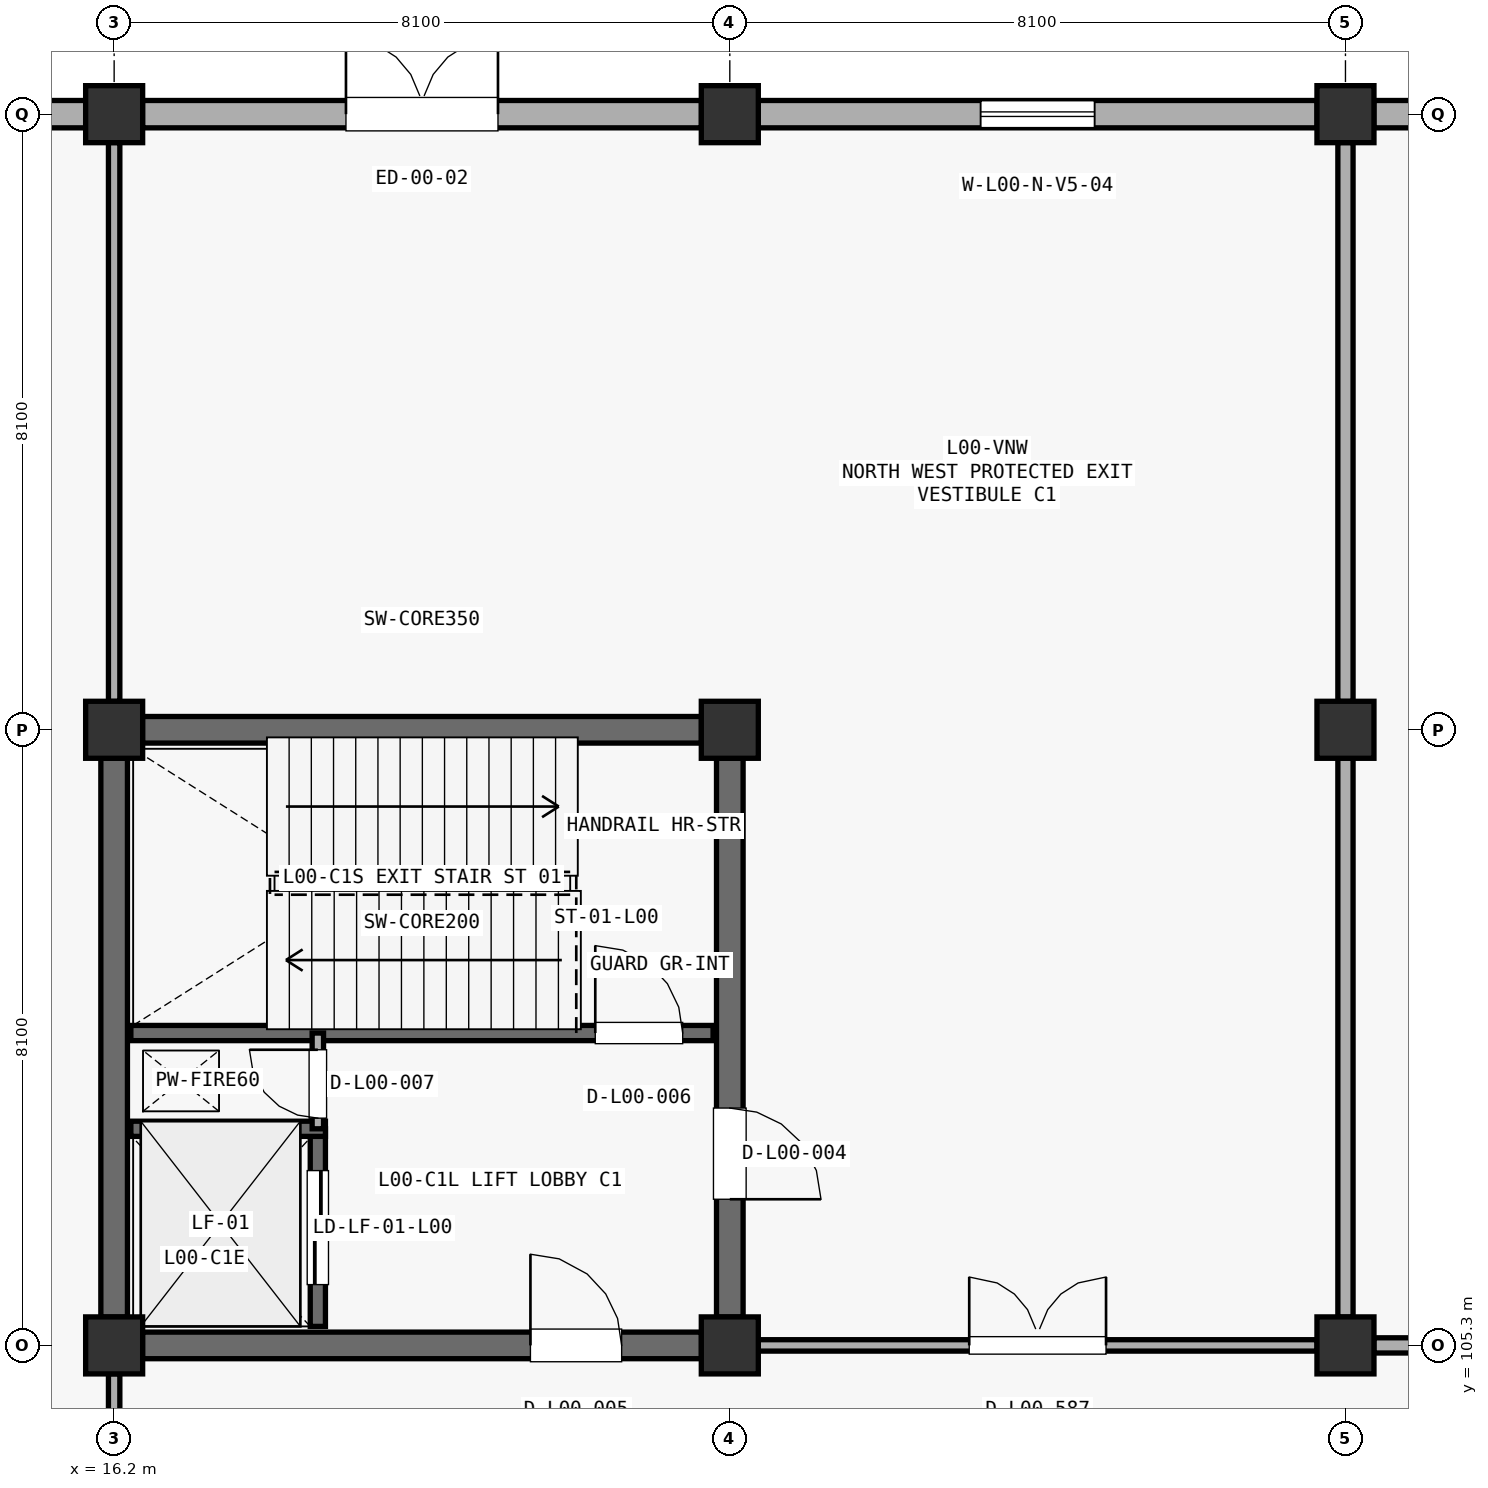
"""IFC4 building model, lengths in metres.
Left out: names, types, materials, properties, quantities, classifications, styles, units other than length and angle.
Written with IfcOpenShell. Run it as: python <this file> out.ifc"""

import sys

from ifc_helpers import new_model, si_unit, direction, frame, frame_2d, origin, origin_2d, place, context, subcontext, project, spatial, rectangle, extrude, element, fill, save


model = new_model("IFC4")
c1 = context("Model", 3, precision=1e-05, world=origin(), true_north=direction((0.0, 1.0)))
c2 = subcontext(c1, "Body", "Model", "MODEL_VIEW")
j1 = project(units=[si_unit("LENGTHUNIT", "METRE"), si_unit("PLANEANGLEUNIT", "RADIAN")], contexts=[c1])
p1 = place(None, origin())
s1 = spatial("IfcSite", under=j1, at=p1, CompositionType="ELEMENT")
p2 = place(p1, origin())
s2 = spatial("IfcBuilding", under=s1, at=p2, CompositionType="ELEMENT")
p3 = place(p2, origin())
s3 = spatial("IfcBuildingStorey", under=s2, at=p3, CompositionType="ELEMENT", Elevation=0.0)
for number, where, z_axis, x_axis in (
    (1, (16.2, 105.3, 0.0), (0.0, 0.0, 1.0), (1.0, 0.0, 0.0)),
    (2, (16.2, 113.4, 0.0), (0.0, 0.0, 1.0), (1.0, 0.0, 0.0)),
    (3, (16.2, 121.5, 0.0), (0.0, 0.0, 1.0), (1.0, 0.0, 0.0)),
    (4, (24.3, 105.3, 0.0), (0.0, 0.0, 1.0), (1.0, 0.0, 0.0)),
    (5, (24.3, 113.4, 0.0), (0.0, 0.0, 1.0), (1.0, 0.0, 0.0)),
    (6, (24.3, 121.5, 0.0), (0.0, 0.0, 1.0), (1.0, 0.0, 0.0)),
    (7, (32.4, 105.3, 0.0), (0.0, 0.0, 1.0), (1.0, 0.0, 0.0)),
    (8, (32.4, 113.4, 0.0), (0.0, 0.0, 1.0), (1.0, 0.0, 0.0)),
    (9, (32.4, 121.5, 0.0), (0.0, 0.0, 1.0), (1.0, 0.0, 0.0)),
):
    element("IfcColumn", number, at=place(p3, frame(where, z_axis=z_axis, x_axis=x_axis)), inside=s3, PredefinedType="COLUMN", context=c2, shape_type="SweptSolid", body=[
        extrude(rectangle(XDim=0.75, YDim=0.75, at=origin_2d()), origin(), (0.0, 0.0, 1.0), 5.1),
    ])
p4 = place(p3, frame((8.473, 121.5, 0.0), z_axis=(0.0, 0.0, 1.0), x_axis=(1.0, 0.0, 0.0)))
e10 = element("IfcWall", 10, at=p4, inside=s3, PredefinedType="STANDARD", context=c2, shape_type="SweptSolid", body=[
    extrude(rectangle(XDim=7.354, YDim=0.36, at=frame_2d((3.677, 0.0))), origin(), (0.0, 0.0, 1.0), 4.222),
])
p5 = place(p4, frame((2.477, 0.0, 0.0)))
e11 = element("IfcOpeningElement", 11, at=p5, cuts=e10, PredefinedType="OPENING", context=c2, shape_type="SweptSolid", body=[
    extrude(rectangle(XDim=2.4, YDim=2.4, at=frame_2d((1.2, 1.2))), frame((0.0, 0.19, 0.0), z_axis=(0.0, -1.0, 0.0), x_axis=(1.0, 0.0, 0.0)), (0.0, 0.0, 1.0), 0.38),
])
p6 = place(p3, frame((16.573, 121.5, 0.0), z_axis=(0.0, 0.0, 1.0), x_axis=(1.0, 0.0, 0.0)))
e12 = element("IfcWall", 12, at=p6, inside=s3, PredefinedType="STANDARD", context=c2, shape_type="SweptSolid", body=[
    extrude(rectangle(XDim=7.354, YDim=0.36, at=frame_2d((3.677, 0.0))), origin(), (0.0, 0.0, 1.0), 3.972),
])
p7 = place(p6, frame((2.677, 0.0, 0.0)))
e13 = element("IfcOpeningElement", 13, at=p7, cuts=e12, PredefinedType="OPENING", context=c2, shape_type="SweptSolid", body=[
    extrude(rectangle(XDim=2.0, YDim=2.2, at=frame_2d((1.0, 1.1))), frame((0.0, 0.19, 0.0), z_axis=(0.0, -1.0, 0.0), x_axis=(1.0, 0.0, 0.0)), (0.0, 0.0, 1.0), 0.38),
])
p8 = place(p3, frame((24.673, 121.5, 0.0), z_axis=(0.0, 0.0, 1.0), x_axis=(1.0, 0.0, 0.0)))
e14 = element("IfcWall", 14, at=p8, inside=s3, PredefinedType="STANDARD", context=c2, shape_type="SweptSolid", body=[
    extrude(rectangle(XDim=7.354, YDim=0.36, at=frame_2d((3.677, 0.0))), origin(), (0.0, 0.0, 1.0), 4.407),
])
p9 = place(p8, frame((2.927, 0.0, 0.85)))
e15 = element("IfcOpeningElement", 15, at=p9, cuts=e14, PredefinedType="OPENING", context=c2, shape_type="SweptSolid", body=[
    extrude(rectangle(XDim=1.5, YDim=1.6, at=frame_2d((0.75, 0.8))), frame((0.0, 0.19, 0.0), z_axis=(0.0, -1.0, 0.0), x_axis=(1.0, 0.0, 0.0)), (0.0, 0.0, 1.0), 0.38),
])
p10 = place(p3, frame((32.773, 121.5, 0.0), z_axis=(0.0, 0.0, 1.0), x_axis=(1.0, 0.0, 0.0)))
e16 = element("IfcWall", 16, at=p10, inside=s3, PredefinedType="STANDARD", context=c2, shape_type="SweptSolid", body=[
    extrude(rectangle(XDim=7.354, YDim=0.36, at=frame_2d((3.677, 0.0))), origin(), (0.0, 0.0, 1.0), 4.072),
])
p11 = place(p10, frame((2.477, 0.0, 0.0)))
e17 = element("IfcOpeningElement", 17, at=p11, cuts=e16, PredefinedType="OPENING", context=c2, shape_type="SweptSolid", body=[
    extrude(rectangle(XDim=2.4, YDim=2.4, at=frame_2d((1.2, 1.2))), frame((0.0, 0.19, 0.0), z_axis=(0.0, -1.0, 0.0), x_axis=(1.0, 0.0, 0.0)), (0.0, 0.0, 1.0), 0.38),
])
for number, where, z_axis, x_axis in (
    (18, (16.573, 113.4, 0.0), (0.0, 0.0, 1.0), (1.0, 0.0, 0.0)),
    (19, (16.2, 105.673, 0.0), (0.0, 0.0, 1.0), (0.0, 1.0, 0.0)),
):
    element("IfcWall", number, at=place(p3, frame(where, z_axis=z_axis, x_axis=x_axis)), inside=s3, PredefinedType="SHEAR", context=c2, shape_type="SweptSolid", body=[
        extrude(rectangle(XDim=7.354, YDim=0.35, at=frame_2d((3.677, 0.0))), origin(), (0.0, 0.0, 1.0), 4.822),
    ])
p12 = place(p3, frame((24.3, 105.673, 0.0), z_axis=(0.0, 0.0, 1.0), x_axis=(0.0, 1.0, 0.0)))
e20 = element("IfcWall", 20, at=p12, inside=s3, PredefinedType="SHEAR", context=c2, shape_type="SweptSolid", body=[
    extrude(rectangle(XDim=7.354, YDim=0.35, at=frame_2d((3.677, 0.0))), origin(), (0.0, 0.0, 1.0), 4.822),
])
p13 = place(p12, frame((2.75, 0.0, 0.0), z_axis=(0.0, 0.0, 1.0), x_axis=(-1.0, 0.0, 0.0)))
e21 = element("IfcOpeningElement", 21, at=p13, cuts=e20, PredefinedType="OPENING", context=c2, shape_type="SweptSolid", body=[
    extrude(rectangle(XDim=1.2, YDim=2.2, at=frame_2d((0.6, 1.1))), frame((0.0, 0.185, 0.0), z_axis=(0.0, -1.0, 0.0), x_axis=(1.0, 0.0, 0.0)), (0.0, 0.0, 1.0), 0.37),
])
p14 = place(p3, frame((16.573, 105.3, 0.0), z_axis=(0.0, 0.0, 1.0), x_axis=(1.0, 0.0, 0.0)))
e22 = element("IfcWall", 22, at=p14, inside=s3, PredefinedType="SHEAR", context=c2, shape_type="SweptSolid", body=[
    extrude(rectangle(XDim=7.354, YDim=0.35, at=frame_2d((3.677, 0.0))), origin(), (0.0, 0.0, 1.0), 4.822),
])
p15 = place(p14, frame((5.104, 0.0, 0.0)))
e23 = element("IfcOpeningElement", 23, at=p15, cuts=e22, PredefinedType="OPENING", context=c2, shape_type="SweptSolid", body=[
    extrude(rectangle(XDim=1.2, YDim=2.2, at=frame_2d((0.6, 1.1))), frame((0.0, 0.185, 0.0), z_axis=(0.0, -1.0, 0.0), x_axis=(1.0, 0.0, 0.0)), (0.0, 0.0, 1.0), 0.37),
])
p16 = place(p3, frame((16.42, 109.41, 0.0), z_axis=(0.0, 0.0, 1.0), x_axis=(1.0, 0.0, 0.0)))
e24 = element("IfcWall", 24, at=p16, inside=s3, PredefinedType="SHEAR", context=c2, shape_type="SweptSolid", body=[
    extrude(rectangle(XDim=7.66, YDim=0.2, at=frame_2d((3.83, 0.0))), origin(), (0.0, 0.0, 1.0), 4.822),
])
p17 = place(p16, frame((6.11, 0.0, 0.0)))
e25 = element("IfcOpeningElement", 25, at=p17, cuts=e24, PredefinedType="OPENING", context=c2, shape_type="SweptSolid", body=[
    extrude(rectangle(XDim=1.15, YDim=2.2, at=frame_2d((0.575, 1.1))), frame((0.0, 0.11, 0.0), z_axis=(0.0, -1.0, 0.0), x_axis=(1.0, 0.0, 0.0)), (0.0, 0.0, 1.0), 0.22),
])
p18 = place(p3, frame((18.88, 105.55, 0.0), z_axis=(0.0, 0.0, 1.0), x_axis=(0.0, 1.0, 0.0)))
e26 = element("IfcWall", 26, at=p18, inside=s3, PredefinedType="SHEAR", context=c2, shape_type="SweptSolid", body=[
    extrude(rectangle(XDim=2.6, YDim=0.2, at=frame_2d((1.3, 0.0))), origin(), (0.0, 0.0, 1.0), 4.822),
])
p19 = place(p18, frame((0.55, 0.0, 0.0)))
e27 = element("IfcOpeningElement", 27, at=p19, cuts=e26, PredefinedType="OPENING", context=c2, shape_type="SweptSolid", body=[
    extrude(rectangle(XDim=1.5, YDim=2.3, at=frame_2d((0.75, 1.15))), frame((0.0, 0.11, 0.0), z_axis=(0.0, -1.0, 0.0), x_axis=(1.0, 0.0, 0.0)), (0.0, 0.0, 1.0), 0.22),
])
p20 = place(p3, frame((16.42, 108.15, 0.0), z_axis=(0.0, 0.0, 1.0), x_axis=(1.0, 0.0, 0.0)))
e28 = element("IfcWall", 28, at=p20, inside=s3, PredefinedType="SHEAR", context=c2, shape_type="SweptSolid", body=[
    extrude(rectangle(XDim=2.56, YDim=0.2, at=frame_2d((1.28, 0.0))), origin(), (0.0, 0.0, 1.0), 4.822),
])
p21 = place(p3, frame((18.88, 108.15, 0.0), z_axis=(0.0, 0.0, 1.0), x_axis=(0.0, 1.0, 0.0)))
e29 = element("IfcWall", 29, at=p21, inside=s3, PredefinedType="PARTITIONING", context=c2, shape_type="SweptSolid", body=[
    extrude(rectangle(XDim=1.26, YDim=0.15, at=frame_2d((0.63, 0.0))), origin(), (0.0, 0.0, 1.0), 4.822),
])
p22 = place(p21, frame((0.14, 0.0, 0.0)))
e30 = element("IfcOpeningElement", 30, at=p22, cuts=e29, PredefinedType="OPENING", context=c2, shape_type="SweptSolid", body=[
    extrude(rectangle(XDim=0.9, YDim=2.15, at=frame_2d((0.45, 1.075))), frame((0.0, 0.085, 0.0), z_axis=(0.0, -1.0, 0.0), x_axis=(1.0, 0.0, 0.0)), (0.0, 0.0, 1.0), 0.17),
])
p23 = place(p3, frame((16.2, 97.573, 0.0), z_axis=(0.0, 0.0, 1.0), x_axis=(0.0, 1.0, 0.0)))
e31 = element("IfcWall", 31, at=p23, inside=s3, PredefinedType="PARTITIONING", context=c2, shape_type="SweptSolid", body=[
    extrude(rectangle(XDim=7.354, YDim=0.15, at=frame_2d((3.677, 0.0))), origin(), (0.0, 0.0, 1.0), 4.222),
])
p24 = place(p23, frame((2.857, 0.0, 0.0)))
e32 = element("IfcOpeningElement", 32, at=p24, cuts=e31, PredefinedType="OPENING", context=c2, shape_type="SweptSolid", body=[
    extrude(rectangle(XDim=1.64, YDim=2.25, at=frame_2d((0.82, 1.125))), frame((0.0, 0.085, 0.0), z_axis=(0.0, -1.0, 0.0), x_axis=(1.0, 0.0, 0.0)), (0.0, 0.0, 1.0), 0.17),
])
p25 = place(p3, frame((16.2, 113.773, 0.0), z_axis=(0.0, 0.0, 1.0), x_axis=(0.0, 1.0, 0.0)))
e33 = element("IfcWall", 33, at=p25, inside=s3, PredefinedType="PARTITIONING", context=c2, shape_type="SweptSolid", body=[
    extrude(rectangle(XDim=7.354, YDim=0.15, at=frame_2d((3.677, 0.0))), origin(), (0.0, 0.0, 1.0), 3.872),
])
p26 = place(p3, frame((32.773, 105.3, 0.0), z_axis=(0.0, 0.0, 1.0), x_axis=(1.0, 0.0, 0.0)))
e34 = element("IfcWall", 34, at=p26, inside=s3, PredefinedType="PARTITIONING", context=c2, shape_type="SweptSolid", body=[
    extrude(rectangle(XDim=7.354, YDim=0.2, at=frame_2d((3.677, 0.0))), origin(), (0.0, 0.0, 1.0), 3.972),
])
p27 = place(p26, frame((2.777, 0.0, 0.0)))
e35 = element("IfcOpeningElement", 35, at=p27, cuts=e34, PredefinedType="OPENING", context=c2, shape_type="SweptSolid", body=[
    extrude(rectangle(XDim=1.8, YDim=2.4, at=frame_2d((0.9, 1.2))), frame((0.0, 0.11, 0.0), z_axis=(0.0, -1.0, 0.0), x_axis=(1.0, 0.0, 0.0)), (0.0, 0.0, 1.0), 0.22),
])
p28 = place(p3, frame((32.4, 105.673, 0.0), z_axis=(0.0, 0.0, 1.0), x_axis=(0.0, 1.0, 0.0)))
e36 = element("IfcWall", 36, at=p28, inside=s3, PredefinedType="PARTITIONING", context=c2, shape_type="SweptSolid", body=[
    extrude(rectangle(XDim=7.354, YDim=0.2, at=frame_2d((3.677, 0.0))), origin(), (0.0, 0.0, 1.0), 4.222),
])
p29 = place(p3, frame((32.4, 113.773, 0.0), z_axis=(0.0, 0.0, 1.0), x_axis=(0.0, 1.0, 0.0)))
e37 = element("IfcWall", 37, at=p29, inside=s3, PredefinedType="PARTITIONING", context=c2, shape_type="SweptSolid", body=[
    extrude(rectangle(XDim=7.354, YDim=0.2, at=frame_2d((3.677, 0.0))), origin(), (0.0, 0.0, 1.0), 3.972),
])
p30 = place(p3, frame((24.673, 105.3, 0.0), z_axis=(0.0, 0.0, 1.0), x_axis=(1.0, 0.0, 0.0)))
e38 = element("IfcWall", 38, at=p30, inside=s3, PredefinedType="PARTITIONING", context=c2, shape_type="SweptSolid", body=[
    extrude(rectangle(XDim=7.354, YDim=0.15, at=frame_2d((3.677, 0.0))), origin(), (0.0, 0.0, 1.0), 4.222),
])
p31 = place(p30, frame((2.777, 0.0, 0.0)))
e39 = element("IfcOpeningElement", 39, at=p31, cuts=e38, PredefinedType="OPENING", context=c2, shape_type="SweptSolid", body=[
    extrude(rectangle(XDim=1.8, YDim=2.2, at=frame_2d((0.9, 1.1))), frame((0.0, 0.085, 0.0), z_axis=(0.0, -1.0, 0.0), x_axis=(1.0, 0.0, 0.0)), (0.0, 0.0, 1.0), 0.17),
])
p32 = place(p7, origin())
e40 = element("IfcDoor", 40, at=p32, inside=s3, OperationType="DOUBLE_SWING_RIGHT", PredefinedType="DOOR", context=c2, shape_type="SweptSolid", body=[
    extrude(rectangle(XDim=2.0, YDim=2.2, at=frame_2d((1.0, 1.1))), frame((0.0, 0.025, 0.0), z_axis=(0.0, -1.0, 0.0), x_axis=(1.0, 0.0, 0.0)), (0.0, 0.0, 1.0), 0.05),
])
fill(e13, e40)
p33 = place(p9, origin())
e41 = element("IfcWindow", 41, at=p33, inside=s3, PartitioningType="SINGLE_PANEL", PredefinedType="WINDOW", context=c2, shape_type="SweptSolid", body=[
    extrude(rectangle(XDim=1.5, YDim=1.6, at=frame_2d((0.75, 0.8))), frame((0.0, 0.03, 0.0), z_axis=(0.0, -1.0, 0.0), x_axis=(1.0, 0.0, 0.0)), (0.0, 0.0, 1.0), 0.06),
])
fill(e15, e41)
p34 = place(p13, origin())
e42 = element("IfcDoor", 42, at=p34, inside=s3, OperationType="SINGLE_SWING_LEFT", PredefinedType="DOOR", context=c2, shape_type="SweptSolid", body=[
    extrude(rectangle(XDim=1.2, YDim=2.2, at=frame_2d((0.6, 1.1))), frame((0.0, 0.025, 0.0), z_axis=(0.0, -1.0, 0.0), x_axis=(1.0, 0.0, 0.0)), (0.0, 0.0, 1.0), 0.05),
])
fill(e21, e42)
p35 = place(p15, origin())
e43 = element("IfcDoor", 43, at=p35, inside=s3, OperationType="SINGLE_SWING_LEFT", PredefinedType="DOOR", context=c2, shape_type="SweptSolid", body=[
    extrude(rectangle(XDim=1.2, YDim=2.2, at=frame_2d((0.6, 1.1))), frame((0.0, 0.025, 0.0), z_axis=(0.0, -1.0, 0.0), x_axis=(1.0, 0.0, 0.0)), (0.0, 0.0, 1.0), 0.05),
])
fill(e23, e43)
p36 = place(p17, origin())
e44 = element("IfcDoor", 44, at=p36, inside=s3, OperationType="SINGLE_SWING_LEFT", PredefinedType="DOOR", context=c2, shape_type="SweptSolid", body=[
    extrude(rectangle(XDim=1.15, YDim=2.2, at=frame_2d((0.575, 1.1))), frame((0.0, 0.025, 0.0), z_axis=(0.0, -1.0, 0.0), x_axis=(1.0, 0.0, 0.0)), (0.0, 0.0, 1.0), 0.05),
])
fill(e25, e44)
p37 = place(p19, origin())
e45 = element("IfcDoor", 45, at=p37, inside=s3, OperationType="SLIDING_TO_LEFT", PredefinedType="DOOR", context=c2, shape_type="SweptSolid", body=[
    extrude(rectangle(XDim=1.5, YDim=2.3, at=frame_2d((0.75, 1.15))), frame((0.0, 0.025, 0.0), z_axis=(0.0, -1.0, 0.0), x_axis=(1.0, 0.0, 0.0)), (0.0, 0.0, 1.0), 0.05),
])
fill(e27, e45)
p38 = place(p22, origin())
e46 = element("IfcDoor", 46, at=p38, inside=s3, OperationType="SINGLE_SWING_RIGHT", PredefinedType="DOOR", context=c2, shape_type="SweptSolid", body=[
    extrude(rectangle(XDim=0.9, YDim=2.15, at=frame_2d((0.45, 1.075))), frame((0.0, 0.025, 0.0), z_axis=(0.0, -1.0, 0.0), x_axis=(1.0, 0.0, 0.0)), (0.0, 0.0, 1.0), 0.05),
])
fill(e30, e46)
p39 = place(p31, origin())
e47 = element("IfcDoor", 47, at=p39, inside=s3, OperationType="DOUBLE_SWING_LEFT", PredefinedType="DOOR", context=c2, shape_type="SweptSolid", body=[
    extrude(rectangle(XDim=1.8, YDim=2.2, at=frame_2d((0.9, 1.1))), frame((0.0, 0.025, 0.0), z_axis=(0.0, -1.0, 0.0), x_axis=(1.0, 0.0, 0.0)), (0.0, 0.0, 1.0), 0.05),
])
fill(e39, e47)
save(model, sys.argv[1])
